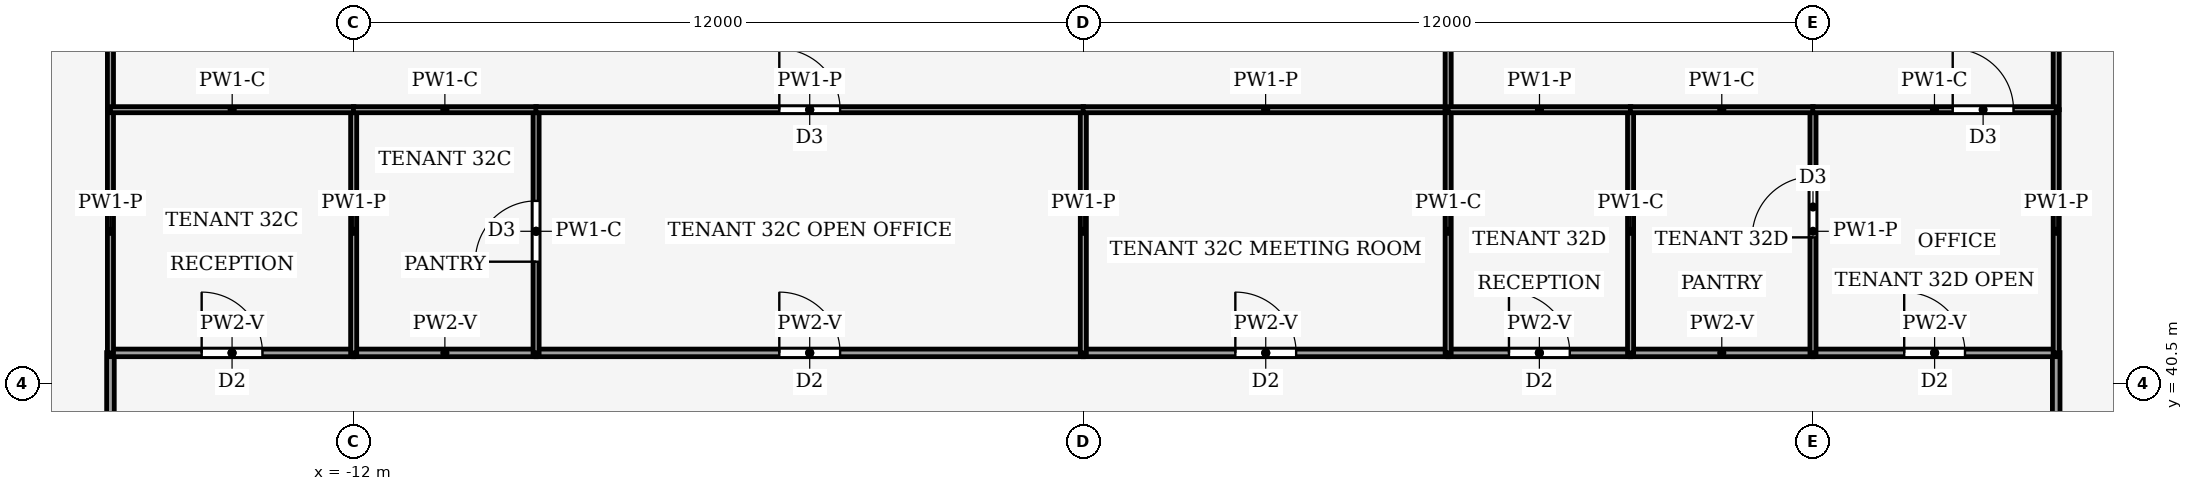
"""IFC4 building model, lengths in metres.
Left out: names, types, materials, properties, quantities, classifications, styles, units other than length and angle.
Written with IfcOpenShell. Run it as: python <this file> out.ifc"""

import sys

from ifc_helpers import new_model, si_unit, direction, frame, frame_2d, origin, place, context, subcontext, project, spatial, rectangle, extrude, element, fill, save


model = new_model("IFC4")
c1 = context("Model", 3, precision=1e-05, world=origin(), true_north=direction((0.0, 1.0)))
c2 = subcontext(c1, "Body", "Model", "MODEL_VIEW")
j1 = project(units=[si_unit("LENGTHUNIT", "METRE"), si_unit("PLANEANGLEUNIT", "RADIAN")], contexts=[c1])
p1 = place(None, origin())
s1 = spatial("IfcSite", under=j1, at=p1, CompositionType="ELEMENT")
p2 = place(p1, origin())
s2 = spatial("IfcBuilding", under=s1, at=p2, CompositionType="ELEMENT")
p3 = place(p2, frame((0.0, 0.0, 142.0)))
s3 = spatial("IfcBuildingStorey", under=s2, at=p3, CompositionType="ELEMENT", Elevation=142.0)
p4 = place(p3, frame((-16.0, 41.004, 0.0), z_axis=(0.0, 0.0, 1.0), x_axis=(0.0, -1.0, 0.0)))
e1 = element("IfcWall", 1, at=p4, inside=s3, PredefinedType="PARTITIONING", context=c2, shape_type="SweptSolid", body=[
    extrude(rectangle(XDim=8.004, YDim=0.125, at=frame_2d((4.002, 0.0))), origin(), (0.0, 0.0, 1.0), 3.14),
])
p5 = place(p4, frame((3.102, 0.0, 0.0)))
e2 = element("IfcOpeningElement", 2, at=p5, cuts=e1, PredefinedType="OPENING", context=c2, shape_type="SweptSolid", body=[
    extrude(rectangle(XDim=1.8, YDim=2.1, at=frame_2d((0.9, 1.05))), frame((0.0, 0.073, 0.0), z_axis=(0.0, -1.0, 0.0), x_axis=(1.0, 0.0, 0.0)), (0.0, 0.0, 1.0), 0.145),
])
p6 = place(p3, frame((16.0, 41.004, 0.0), z_axis=(0.0, 0.0, 1.0), x_axis=(0.0, -1.0, 0.0)))
e3 = element("IfcWall", 3, at=p6, inside=s3, PredefinedType="PARTITIONING", context=c2, shape_type="SweptSolid", body=[
    extrude(rectangle(XDim=11.004, YDim=0.125, at=frame_2d((5.502, 0.0))), origin(), (0.0, 0.0, 1.0), 3.14),
])
p7 = place(p6, frame((5.002, 0.0, 0.0)))
e4 = element("IfcOpeningElement", 4, at=p7, cuts=e3, PredefinedType="OPENING", context=c2, shape_type="SweptSolid", body=[
    extrude(rectangle(XDim=1.0, YDim=2.1, at=frame_2d((0.5, 1.05))), frame((0.0, 0.073, 0.0), z_axis=(0.0, -1.0, 0.0), x_axis=(1.0, 0.0, 0.0)), (0.0, 0.0, 1.0), 0.145),
])
p8 = place(p3, frame((-16.0, 41.0, 0.0), z_axis=(0.0, 0.0, 1.0), x_axis=(1.0, 0.0, 0.0)))
e5 = element("IfcWall", 5, at=p8, inside=s3, PredefinedType="PARTITIONING", context=c2, shape_type="SweptSolid", body=[
    extrude(rectangle(XDim=4.0, YDim=0.125, at=frame_2d((2.0, 0.0))), origin(), (0.0, 0.0, 1.0), 3.44),
])
p9 = place(p8, frame((1.5, 0.0, 0.0)))
e6 = element("IfcOpeningElement", 6, at=p9, cuts=e5, PredefinedType="OPENING", context=c2, shape_type="SweptSolid", body=[
    extrude(rectangle(XDim=1.0, YDim=2.1, at=frame_2d((0.5, 1.05))), frame((0.0, 0.073, 0.0), z_axis=(0.0, -1.0, 0.0), x_axis=(1.0, 0.0, 0.0)), (0.0, 0.0, 1.0), 0.145),
])
p10 = place(p3, frame((-9.0, 41.0, 0.0), z_axis=(0.0, 0.0, 1.0), x_axis=(-1.0, 0.0, 0.0)))
e7 = element("IfcWall", 7, at=p10, inside=s3, PredefinedType="PARTITIONING", context=c2, shape_type="SweptSolid", body=[
    extrude(rectangle(XDim=3.0, YDim=0.125, at=frame_2d((1.5, 0.0))), origin(), (0.0, 0.0, 1.0), 3.44),
])
p11 = place(p3, frame((-9.0, 41.0, 0.0), z_axis=(0.0, 0.0, 1.0), x_axis=(1.0, 0.0, 0.0)))
e8 = element("IfcWall", 8, at=p11, inside=s3, PredefinedType="PARTITIONING", context=c2, shape_type="SweptSolid", body=[
    extrude(rectangle(XDim=9.0, YDim=0.125, at=frame_2d((4.5, 0.0))), origin(), (0.0, 0.0, 1.0), 3.44),
])
p12 = place(p11, frame((4.0, 0.0, 0.0)))
e9 = element("IfcOpeningElement", 9, at=p12, cuts=e8, PredefinedType="OPENING", context=c2, shape_type="SweptSolid", body=[
    extrude(rectangle(XDim=1.0, YDim=2.1, at=frame_2d((0.5, 1.05))), frame((0.0, 0.073, 0.0), z_axis=(0.0, -1.0, 0.0), x_axis=(1.0, 0.0, 0.0)), (0.0, 0.0, 1.0), 0.145),
])
p13 = place(p3, frame((0.0, 41.0, 0.0), z_axis=(0.0, 0.0, 1.0), x_axis=(1.0, 0.0, 0.0)))
e10 = element("IfcWall", 10, at=p13, inside=s3, PredefinedType="PARTITIONING", context=c2, shape_type="SweptSolid", body=[
    extrude(rectangle(XDim=6.0, YDim=0.125, at=frame_2d((3.0, 0.0))), origin(), (0.0, 0.0, 1.0), 3.44),
])
p14 = place(p13, frame((2.5, 0.0, 0.0)))
e11 = element("IfcOpeningElement", 11, at=p14, cuts=e10, PredefinedType="OPENING", context=c2, shape_type="SweptSolid", body=[
    extrude(rectangle(XDim=1.0, YDim=2.1, at=frame_2d((0.5, 1.05))), frame((0.0, 0.073, 0.0), z_axis=(0.0, -1.0, 0.0), x_axis=(1.0, 0.0, 0.0)), (0.0, 0.0, 1.0), 0.145),
])
p15 = place(p3, frame((6.0, 41.0, 0.0), z_axis=(0.0, 0.0, 1.0), x_axis=(1.0, 0.0, 0.0)))
e12 = element("IfcWall", 12, at=p15, inside=s3, PredefinedType="PARTITIONING", context=c2, shape_type="SweptSolid", body=[
    extrude(rectangle(XDim=3.0, YDim=0.125, at=frame_2d((1.5, 0.0))), origin(), (0.0, 0.0, 1.0), 3.44),
])
p16 = place(p15, frame((1.0, 0.0, 0.0)))
e13 = element("IfcOpeningElement", 13, at=p16, cuts=e12, PredefinedType="OPENING", context=c2, shape_type="SweptSolid", body=[
    extrude(rectangle(XDim=1.0, YDim=2.1, at=frame_2d((0.5, 1.05))), frame((0.0, 0.073, 0.0), z_axis=(0.0, -1.0, 0.0), x_axis=(1.0, 0.0, 0.0)), (0.0, 0.0, 1.0), 0.145),
])
p17 = place(p3, frame((12.0, 41.0, 0.0), z_axis=(0.0, 0.0, 1.0), x_axis=(-1.0, 0.0, 0.0)))
e14 = element("IfcWall", 14, at=p17, inside=s3, PredefinedType="PARTITIONING", context=c2, shape_type="SweptSolid", body=[
    extrude(rectangle(XDim=3.0, YDim=0.125, at=frame_2d((1.5, 0.0))), origin(), (0.0, 0.0, 1.0), 3.44),
])
p18 = place(p3, frame((12.0, 41.0, 0.0), z_axis=(0.0, 0.0, 1.0), x_axis=(1.0, 0.0, 0.0)))
e15 = element("IfcWall", 15, at=p18, inside=s3, PredefinedType="PARTITIONING", context=c2, shape_type="SweptSolid", body=[
    extrude(rectangle(XDim=4.0, YDim=0.125, at=frame_2d((2.0, 0.0))), origin(), (0.0, 0.0, 1.0), 3.44),
])
p19 = place(p18, frame((1.5, 0.0, 0.0)))
e16 = element("IfcOpeningElement", 16, at=p19, cuts=e15, PredefinedType="OPENING", context=c2, shape_type="SweptSolid", body=[
    extrude(rectangle(XDim=1.0, YDim=2.1, at=frame_2d((0.5, 1.05))), frame((0.0, 0.073, 0.0), z_axis=(0.0, -1.0, 0.0), x_axis=(1.0, 0.0, 0.0)), (0.0, 0.0, 1.0), 0.145),
])
p20 = place(p3, frame((-16.0, 41.0, 0.0), z_axis=(0.0, 0.0, 1.0), x_axis=(0.0, 1.0, 0.0)))
e17 = element("IfcWall", 17, at=p20, inside=s3, PredefinedType="PARTITIONING", context=c2, shape_type="SweptSolid", body=[
    extrude(rectangle(XDim=4.0, YDim=0.1, at=frame_2d((2.0, 0.0))), origin(), (0.0, 0.0, 1.0), 3.44),
])
p21 = place(p3, frame((-16.0, 45.0, 0.0), z_axis=(0.0, 0.0, 1.0), x_axis=(0.0, 1.0, 0.0)))
e18 = element("IfcWall", 18, at=p21, inside=s3, PredefinedType="PARTITIONING", context=c2, shape_type="SweptSolid", body=[
    extrude(rectangle(XDim=9.0, YDim=0.1, at=frame_2d((4.5, 0.0))), origin(), (0.0, 0.0, 1.0), 3.24),
])
p22 = place(p3, frame((16.0, 45.0, 0.0), z_axis=(0.0, 0.0, 1.0), x_axis=(0.0, -1.0, 0.0)))
e19 = element("IfcWall", 19, at=p22, inside=s3, PredefinedType="PARTITIONING", context=c2, shape_type="SweptSolid", body=[
    extrude(rectangle(XDim=4.0, YDim=0.1, at=frame_2d((2.0, 0.0))), origin(), (0.0, 0.0, 1.0), 3.44),
])
p23 = place(p3, frame((16.0, 57.0, 0.0), z_axis=(0.0, 0.0, 1.0), x_axis=(0.0, -1.0, 0.0)))
e20 = element("IfcWall", 20, at=p23, inside=s3, PredefinedType="PARTITIONING", context=c2, shape_type="SweptSolid", body=[
    extrude(rectangle(XDim=12.0, YDim=0.1, at=frame_2d((6.0, 0.0))), origin(), (0.0, 0.0, 1.0), 3.24),
])
p24 = place(p3, frame((-12.0, 41.0, 0.0), z_axis=(0.0, 0.0, 1.0), x_axis=(0.0, 1.0, 0.0)))
e21 = element("IfcWall", 21, at=p24, inside=s3, PredefinedType="PARTITIONING", context=c2, shape_type="SweptSolid", body=[
    extrude(rectangle(XDim=4.0, YDim=0.1, at=frame_2d((2.0, 0.0))), origin(), (0.0, 0.0, 1.0), 3.44),
])
p25 = place(p3, frame((-11.996, 45.0, 0.0), z_axis=(0.0, 0.0, 1.0), x_axis=(-1.0, 0.0, 0.0)))
e22 = element("IfcWall", 22, at=p25, inside=s3, PredefinedType="PARTITIONING", context=c2, shape_type="SweptSolid", body=[
    extrude(rectangle(XDim=4.004, YDim=0.1, at=frame_2d((2.002, 0.0))), origin(), (0.0, 0.0, 1.0), 3.87),
])
p26 = place(p3, frame((-9.0, 41.0, 0.0), z_axis=(0.0, 0.0, 1.0), x_axis=(0.0, 1.0, 0.0)))
e23 = element("IfcWall", 23, at=p26, inside=s3, PredefinedType="PARTITIONING", context=c2, shape_type="SweptSolid", body=[
    extrude(rectangle(XDim=4.0, YDim=0.1, at=frame_2d((2.0, 0.0))), origin(), (0.0, 0.0, 1.0), 3.87),
])
p27 = place(p26, frame((1.5, 0.0, 0.0)))
e24 = element("IfcOpeningElement", 24, at=p27, cuts=e23, PredefinedType="OPENING", context=c2, shape_type="SweptSolid", body=[
    extrude(rectangle(XDim=1.0, YDim=2.1, at=frame_2d((0.5, 1.05))), frame((0.0, 0.06, 0.0), z_axis=(0.0, -1.0, 0.0), x_axis=(1.0, 0.0, 0.0)), (0.0, 0.0, 1.0), 0.12),
])
p28 = place(p3, frame((-8.996, 45.0, 0.0), z_axis=(0.0, 0.0, 1.0), x_axis=(-1.0, 0.0, 0.0)))
e25 = element("IfcWall", 25, at=p28, inside=s3, PredefinedType="PARTITIONING", context=c2, shape_type="SweptSolid", body=[
    extrude(rectangle(XDim=3.008, YDim=0.1, at=frame_2d((1.504, 0.0))), origin(), (0.0, 0.0, 1.0), 3.87),
])
p29 = place(p3, frame((0.0, 41.0, 0.0), z_axis=(0.0, 0.0, 1.0), x_axis=(0.0, 1.0, 0.0)))
e26 = element("IfcWall", 26, at=p29, inside=s3, PredefinedType="PARTITIONING", context=c2, shape_type="SweptSolid", body=[
    extrude(rectangle(XDim=4.0, YDim=0.1, at=frame_2d((2.0, 0.0))), origin(), (0.0, 0.0, 1.0), 3.44),
])
p30 = place(p3, frame((-9.004, 45.0, 0.0), z_axis=(0.0, 0.0, 1.0), x_axis=(1.0, 0.0, 0.0)))
e27 = element("IfcWall", 27, at=p30, inside=s3, PredefinedType="PARTITIONING", context=c2, shape_type="SweptSolid", body=[
    extrude(rectangle(XDim=9.008, YDim=0.1, at=frame_2d((4.504, 0.0))), origin(), (0.0, 0.0, 1.0), 3.44),
])
p31 = place(p30, frame((4.004, 0.0, 0.0)))
e28 = element("IfcOpeningElement", 28, at=p31, cuts=e27, PredefinedType="OPENING", context=c2, shape_type="SweptSolid", body=[
    extrude(rectangle(XDim=1.0, YDim=2.1, at=frame_2d((0.5, 1.05))), frame((0.0, 0.06, 0.0), z_axis=(0.0, -1.0, 0.0), x_axis=(1.0, 0.0, 0.0)), (0.0, 0.0, 1.0), 0.12),
])
p32 = place(p3, frame((6.0, 45.0, 0.0), z_axis=(0.0, 0.0, 1.0), x_axis=(-1.0, 0.0, 0.0)))
e29 = element("IfcWall", 29, at=p32, inside=s3, PredefinedType="PARTITIONING", context=c2, shape_type="SweptSolid", body=[
    extrude(rectangle(XDim=6.004, YDim=0.1, at=frame_2d((3.002, 0.0))), origin(), (0.0, 0.0, 1.0), 3.44),
])
p33 = place(p3, frame((6.0, 41.0, 0.0), z_axis=(0.0, 0.0, 1.0), x_axis=(0.0, 1.0, 0.0)))
e30 = element("IfcWall", 30, at=p33, inside=s3, PredefinedType="PARTITIONING", context=c2, shape_type="SweptSolid", body=[
    extrude(rectangle(XDim=4.0, YDim=0.1, at=frame_2d((2.0, 0.0))), origin(), (0.0, 0.0, 1.0), 3.87),
])
p34 = place(p3, frame((6.0, 45.0, 0.0), z_axis=(0.0, 0.0, 1.0), x_axis=(0.0, 1.0, 0.0)))
e31 = element("IfcWall", 31, at=p34, inside=s3, PredefinedType="PARTITIONING", context=c2, shape_type="SweptSolid", body=[
    extrude(rectangle(XDim=9.004, YDim=0.1, at=frame_2d((4.502, 0.0))), origin(), (0.0, 0.0, 1.0), 3.24),
])
p35 = place(p3, frame((9.0, 41.0, 0.0), z_axis=(0.0, 0.0, 1.0), x_axis=(0.0, 1.0, 0.0)))
e32 = element("IfcWall", 32, at=p35, inside=s3, PredefinedType="PARTITIONING", context=c2, shape_type="SweptSolid", body=[
    extrude(rectangle(XDim=4.0, YDim=0.1, at=frame_2d((2.0, 0.0))), origin(), (0.0, 0.0, 1.0), 3.87),
])
p36 = place(p3, frame((9.004, 45.0, 0.0), z_axis=(0.0, 0.0, 1.0), x_axis=(-1.0, 0.0, 0.0)))
e33 = element("IfcWall", 33, at=p36, inside=s3, PredefinedType="PARTITIONING", context=c2, shape_type="SweptSolid", body=[
    extrude(rectangle(XDim=3.004, YDim=0.1, at=frame_2d((1.502, 0.0))), origin(), (0.0, 0.0, 1.0), 3.44),
])
p37 = place(p3, frame((12.0, 41.0, 0.0), z_axis=(0.0, 0.0, 1.0), x_axis=(0.0, 1.0, 0.0)))
e34 = element("IfcWall", 34, at=p37, inside=s3, PredefinedType="PARTITIONING", context=c2, shape_type="SweptSolid", body=[
    extrude(rectangle(XDim=4.0, YDim=0.1, at=frame_2d((2.0, 0.0))), origin(), (0.0, 0.0, 1.0), 3.44),
])
p38 = place(p37, frame((1.9, 0.0, 0.0)))
e35 = element("IfcOpeningElement", 35, at=p38, cuts=e34, PredefinedType="OPENING", context=c2, shape_type="SweptSolid", body=[
    extrude(rectangle(XDim=1.0, YDim=2.1, at=frame_2d((0.5, 1.05))), frame((0.0, 0.06, 0.0), z_axis=(0.0, -1.0, 0.0), x_axis=(1.0, 0.0, 0.0)), (0.0, 0.0, 1.0), 0.12),
])
p39 = place(p3, frame((12.004, 45.0, 0.0), z_axis=(0.0, 0.0, 1.0), x_axis=(-1.0, 0.0, 0.0)))
e36 = element("IfcWall", 36, at=p39, inside=s3, PredefinedType="PARTITIONING", context=c2, shape_type="SweptSolid", body=[
    extrude(rectangle(XDim=3.008, YDim=0.1, at=frame_2d((1.504, 0.0))), origin(), (0.0, 0.0, 1.0), 3.87),
])
p40 = place(p3, frame((11.996, 45.0, 0.0), z_axis=(0.0, 0.0, 1.0), x_axis=(1.0, 0.0, 0.0)))
e37 = element("IfcWall", 37, at=p40, inside=s3, PredefinedType="PARTITIONING", context=c2, shape_type="SweptSolid", body=[
    extrude(rectangle(XDim=4.004, YDim=0.1, at=frame_2d((2.002, 0.0))), origin(), (0.0, 0.0, 1.0), 3.87),
])
p41 = place(p40, frame((2.302, 0.0, 0.0)))
e38 = element("IfcOpeningElement", 38, at=p41, cuts=e37, PredefinedType="OPENING", context=c2, shape_type="SweptSolid", body=[
    extrude(rectangle(XDim=1.0, YDim=2.1, at=frame_2d((0.5, 1.05))), frame((0.0, 0.06, 0.0), z_axis=(0.0, -1.0, 0.0), x_axis=(1.0, 0.0, 0.0)), (0.0, 0.0, 1.0), 0.12),
])
p42 = place(p9, origin())
e39 = element("IfcDoor", 39, at=p42, inside=s3, OperationType="SINGLE_SWING_LEFT", PredefinedType="DOOR", context=c2, shape_type="SweptSolid", body=[
    extrude(rectangle(XDim=1.0, YDim=2.1, at=frame_2d((0.5, 1.05))), frame((0.0, 0.025, 0.0), z_axis=(0.0, -1.0, 0.0), x_axis=(1.0, 0.0, 0.0)), (0.0, 0.0, 1.0), 0.05),
])
fill(e6, e39)
p43 = place(p12, origin())
e40 = element("IfcDoor", 40, at=p43, inside=s3, OperationType="SINGLE_SWING_RIGHT", PredefinedType="DOOR", context=c2, shape_type="SweptSolid", body=[
    extrude(rectangle(XDim=1.0, YDim=2.1, at=frame_2d((0.5, 1.05))), frame((0.0, 0.025, 0.0), z_axis=(0.0, -1.0, 0.0), x_axis=(1.0, 0.0, 0.0)), (0.0, 0.0, 1.0), 0.05),
])
fill(e9, e40)
p44 = place(p14, origin())
e41 = element("IfcDoor", 41, at=p44, inside=s3, OperationType="SINGLE_SWING_LEFT", PredefinedType="DOOR", context=c2, shape_type="SweptSolid", body=[
    extrude(rectangle(XDim=1.0, YDim=2.1, at=frame_2d((0.5, 1.05))), frame((0.0, 0.025, 0.0), z_axis=(0.0, -1.0, 0.0), x_axis=(1.0, 0.0, 0.0)), (0.0, 0.0, 1.0), 0.05),
])
fill(e11, e41)
p45 = place(p16, origin())
e42 = element("IfcDoor", 42, at=p45, inside=s3, OperationType="SINGLE_SWING_RIGHT", PredefinedType="DOOR", context=c2, shape_type="SweptSolid", body=[
    extrude(rectangle(XDim=1.0, YDim=2.1, at=frame_2d((0.5, 1.05))), frame((0.0, 0.025, 0.0), z_axis=(0.0, -1.0, 0.0), x_axis=(1.0, 0.0, 0.0)), (0.0, 0.0, 1.0), 0.05),
])
fill(e13, e42)
p46 = place(p19, origin())
e43 = element("IfcDoor", 43, at=p46, inside=s3, OperationType="SINGLE_SWING_LEFT", PredefinedType="DOOR", context=c2, shape_type="SweptSolid", body=[
    extrude(rectangle(XDim=1.0, YDim=2.1, at=frame_2d((0.5, 1.05))), frame((0.0, 0.025, 0.0), z_axis=(0.0, -1.0, 0.0), x_axis=(1.0, 0.0, 0.0)), (0.0, 0.0, 1.0), 0.05),
])
fill(e16, e43)
p47 = place(p27, origin())
e44 = element("IfcDoor", 44, at=p47, inside=s3, OperationType="SINGLE_SWING_RIGHT", PredefinedType="DOOR", context=c2, shape_type="SweptSolid", body=[
    extrude(rectangle(XDim=1.0, YDim=2.1, at=frame_2d((0.5, 1.05))), frame((0.0, 0.025, 0.0), z_axis=(0.0, -1.0, 0.0), x_axis=(1.0, 0.0, 0.0)), (0.0, 0.0, 1.0), 0.05),
])
fill(e24, e44)
p48 = place(p31, origin())
e45 = element("IfcDoor", 45, at=p48, inside=s3, OperationType="SINGLE_SWING_LEFT", PredefinedType="DOOR", context=c2, shape_type="SweptSolid", body=[
    extrude(rectangle(XDim=1.0, YDim=2.1, at=frame_2d((0.5, 1.05))), frame((0.0, 0.025, 0.0), z_axis=(0.0, -1.0, 0.0), x_axis=(1.0, 0.0, 0.0)), (0.0, 0.0, 1.0), 0.05),
])
fill(e28, e45)
p49 = place(p38, origin())
e46 = element("IfcDoor", 46, at=p49, inside=s3, OperationType="SINGLE_SWING_RIGHT", PredefinedType="DOOR", context=c2, shape_type="SweptSolid", body=[
    extrude(rectangle(XDim=1.0, YDim=2.1, at=frame_2d((0.5, 1.05))), frame((0.0, 0.025, 0.0), z_axis=(0.0, -1.0, 0.0), x_axis=(1.0, 0.0, 0.0)), (0.0, 0.0, 1.0), 0.05),
])
fill(e35, e46)
p50 = place(p41, origin())
e47 = element("IfcDoor", 47, at=p50, inside=s3, OperationType="SINGLE_SWING_RIGHT", PredefinedType="DOOR", context=c2, shape_type="SweptSolid", body=[
    extrude(rectangle(XDim=1.0, YDim=2.1, at=frame_2d((0.5, 1.05))), frame((0.0, 0.025, 0.0), z_axis=(0.0, -1.0, 0.0), x_axis=(1.0, 0.0, 0.0)), (0.0, 0.0, 1.0), 0.05),
])
fill(e38, e47)
save(model, sys.argv[1])
